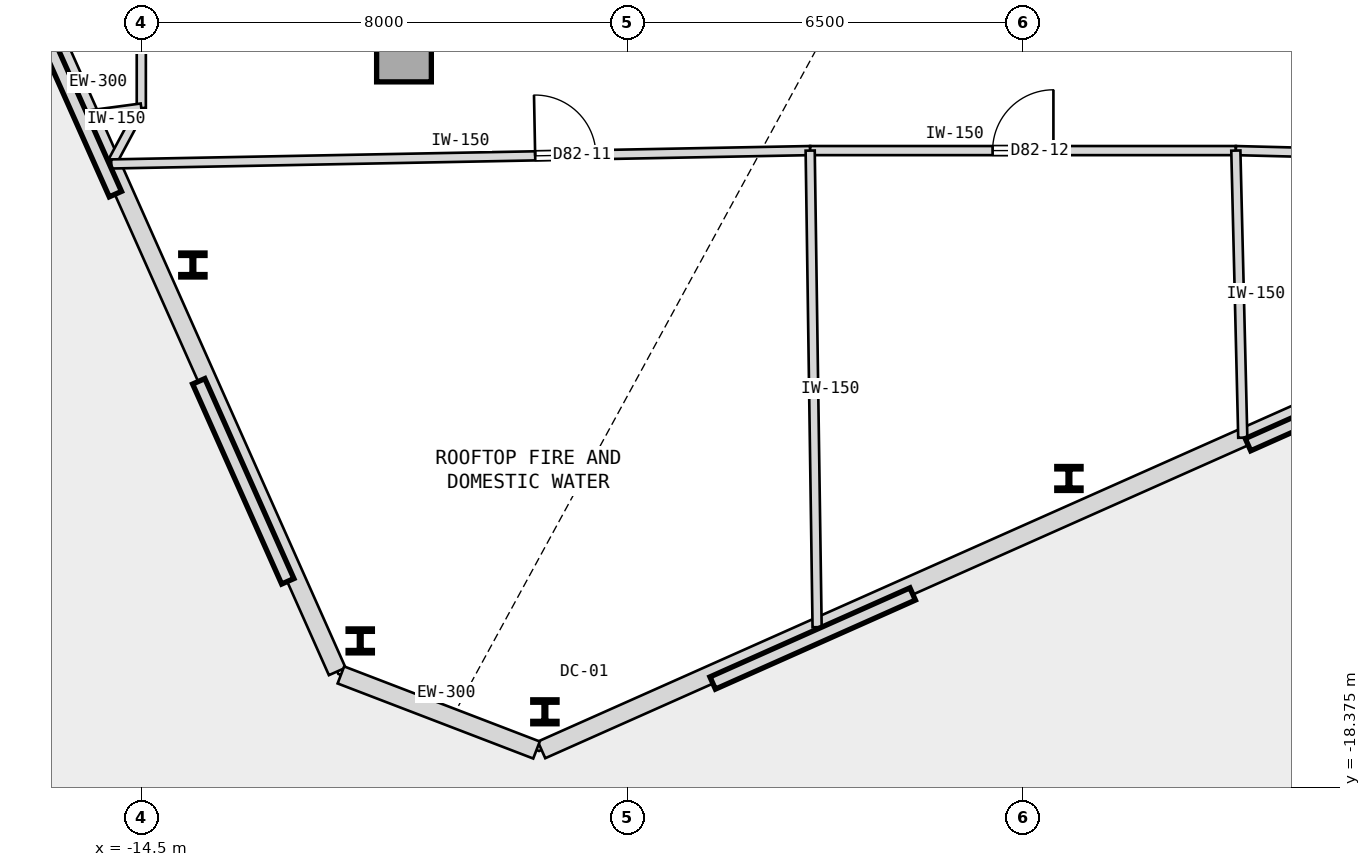
"""IFC4 building model, lengths in metres.
Left out: names, types, materials, properties, quantities, classifications, styles, units other than length and angle.
Written with IfcOpenShell. Run it as: python <this file> out.ifc"""

import sys

from ifc_helpers import new_model, si_unit, direction, frame, frame_2d, origin, origin_2d, place, context, subcontext, project, spatial, rectangle, i_section, extrude, element, fill, save


model = new_model("IFC4")
c1 = context("Model", 3, precision=1e-05, world=origin(), true_north=direction((0.0, 1.0)))
c2 = subcontext(c1, "Body", "Model", "MODEL_VIEW")
j1 = project(units=[si_unit("LENGTHUNIT", "METRE"), si_unit("PLANEANGLEUNIT", "RADIAN")], contexts=[c1])
p1 = place(None, origin())
s1 = spatial("IfcSite", under=j1, at=p1, CompositionType="ELEMENT")
p2 = place(p1, origin())
s2 = spatial("IfcBuilding", under=s1, at=p2, CompositionType="ELEMENT")
p3 = place(p2, frame((0.0, 0.0, 305.55)))
s3 = spatial("IfcBuildingStorey", under=s2, at=p3, CompositionType="ELEMENT", Elevation=305.55)
p4 = place(p3, frame((-10.18, -6.32, 0.0), z_axis=(0.0, 0.0, 1.0), x_axis=(1.0, 0.0, 0.0)))
e1 = element("IfcColumn", 1, at=p4, inside=s3, PredefinedType="COLUMN", context=c2, shape_type="SweptSolid", body=[
    extrude(rectangle(XDim=0.9, YDim=0.9, at=origin_2d()), origin(), (0.0, 0.0, 1.0), 6.45),
])
for number, where, z_axis, x_axis in (
    (2, (-7.863, -17.129, 0.0), (0.0, 0.0, 1.0), (1.0, 0.0, 0.0)),
    (3, (0.755, -13.292, 0.0), (0.0, 0.0, 1.0), (1.0, 0.0, 0.0)),
    (4, (-13.652, -9.781, 0.0), (0.0, 0.0, 1.0), (1.0, 0.0, 0.0)),
    (5, (-10.899, -15.963, 0.0), (0.0, 0.0, 1.0), (1.0, 0.0, 0.0)),
):
    element("IfcColumn", number, at=place(p3, frame(where, z_axis=z_axis, x_axis=x_axis)), inside=s3, PredefinedType="COLUMN", context=c2, shape_type="SweptSolid", body=[
        extrude(i_section(OverallWidth=0.399, OverallDepth=0.394, WebThickness=0.023, FlangeThickness=0.037, FilletRadius=0.015, at=origin_2d()), origin(), (0.0, 0.0, 1.0), 6.45),
    ])
p5 = place(p3, frame((-7.918, -17.756, 0.0), z_axis=(0.0, 0.0, 1.0), x_axis=(0.913542158844, 0.406744052217, 0.0)))
e6 = element("IfcWall", 6, at=p5, inside=s3, PredefinedType="STANDARD", context=c2, shape_type="SweptSolid", body=[
    extrude(rectangle(XDim=28.91, YDim=0.3, at=frame_2d((14.455, 0.0))), origin(), (0.0, 0.0, 1.0), 6.1),
])
p6 = place(p3, frame((-19.783, 2.637, 0.0), z_axis=(0.0, 0.0, 1.0), x_axis=(0.406736369999, -0.913545579224, 0.0)))
e7 = element("IfcWall", 7, at=p6, inside=s3, PredefinedType="STANDARD", context=c2, shape_type="SweptSolid", body=[
    extrude(rectangle(XDim=20.91, YDim=0.3, at=frame_2d((10.455, 0.0))), origin(), (0.0, 0.0, 1.0), 6.1),
])
p7 = place(p3, frame((-11.218, -16.523, 0.0), z_axis=(0.0, 0.0, 1.0), x_axis=(0.933599212806, -0.358319005704, 0.0)))
e8 = element("IfcWall", 8, at=p7, inside=s3, PredefinedType="STANDARD", context=c2, shape_type="SweptSolid", body=[
    extrude(rectangle(XDim=3.446, YDim=0.3, at=frame_2d((1.723, 0.0))), origin(), (0.0, 0.0, 1.0), 6.1),
])
p8 = place(p3, frame((-13.24, -30.161, 0.0), z_axis=(0.0, 0.0, 1.0), x_axis=(0.913545087995, 0.406737473317, 0.0)))
e9 = element("IfcWall", 9, at=p8, inside=s3, PredefinedType="PARAPET", context=c2, shape_type="SweptSolid", body=[
    extrude(rectangle(XDim=51.158, YDim=0.22, at=frame_2d((25.579, 0.0))), origin(), (0.0, 0.0, 1.0), 1.2),
])
p9 = place(p3, frame((-14.5, -7.2, 0.0), z_axis=(0.0, 0.0, 1.0), x_axis=(0.0, 1.0, 0.0)))
e10 = element("IfcWall", 10, at=p9, inside=s3, PredefinedType="PARTITIONING", context=c2, shape_type="SweptSolid", body=[
    extrude(rectangle(XDim=1.6, YDim=0.15, at=frame_2d((0.8, 0.0))), origin(), (0.0, 0.0, 1.0), 6.1),
])
p10 = place(p3, frame((-14.994, -8.12, 0.0), z_axis=(0.0, 0.0, 1.0), x_axis=(0.472844275985, 0.881146009847, 0.0)))
e11 = element("IfcWall", 11, at=p10, inside=s3, PredefinedType="PARTITIONING", context=c2, shape_type="SweptSolid", body=[
    extrude(rectangle(XDim=1.044, YDim=0.15, at=frame_2d((0.522, 0.0))), origin(), (0.0, 0.0, 1.0), 6.1),
])
p11 = place(p3, frame((-14.994, -8.12, 0.0), z_axis=(0.0, 0.0, 1.0), x_axis=(0.99981691014, 0.019134947025, 0.0)))
e12 = element("IfcWall", 12, at=p11, inside=s3, PredefinedType="PARTITIONING", context=c2, shape_type="SweptSolid", body=[
    extrude(rectangle(XDim=11.496, YDim=0.15, at=frame_2d((5.748, 0.0))), origin(), (0.0, 0.0, 1.0), 6.1),
])
p12 = place(p11, frame((6.972, 0.0, 0.0)))
e13 = element("IfcOpeningElement", 13, at=p12, cuts=e12, PredefinedType="OPENING", context=c2, shape_type="SweptSolid", body=[
    extrude(rectangle(XDim=1.0, YDim=2.15, at=frame_2d((0.5, 1.075))), frame((0.0, 0.085, 0.0), z_axis=(0.0, -1.0, 0.0), x_axis=(1.0, 0.0, 0.0)), (0.0, 0.0, 1.0), 0.17),
])
p13 = place(p3, frame((-3.5, -7.9, 0.0), z_axis=(0.0, 0.0, 1.0), x_axis=(1.0, 0.0, 0.0)))
e14 = element("IfcWall", 14, at=p13, inside=s3, PredefinedType="PARTITIONING", context=c2, shape_type="SweptSolid", body=[
    extrude(rectangle(XDim=7.0, YDim=0.15, at=frame_2d((3.5, 0.0))), origin(), (0.0, 0.0, 1.0), 6.1),
])
p14 = place(p13, frame((3.0, 0.0, 0.0)))
e15 = element("IfcOpeningElement", 15, at=p14, cuts=e14, PredefinedType="OPENING", context=c2, shape_type="SweptSolid", body=[
    extrude(rectangle(XDim=1.0, YDim=2.15, at=frame_2d((0.5, 1.075))), frame((0.0, 0.085, 0.0), z_axis=(0.0, -1.0, 0.0), x_axis=(1.0, 0.0, 0.0)), (0.0, 0.0, 1.0), 0.17),
])
p15 = place(p3, frame((3.5, -7.9, 0.0), z_axis=(0.0, 0.0, 1.0), x_axis=(0.99968204603, -0.025215210576, 0.0)))
e16 = element("IfcWall", 16, at=p15, inside=s3, PredefinedType="PARTITIONING", context=c2, shape_type="SweptSolid", body=[
    extrude(rectangle(XDim=10.147, YDim=0.15, at=frame_2d((5.073, 0.0))), origin(), (0.0, 0.0, 1.0), 6.1),
])
p16 = place(p15, frame((4.573, 0.0, 0.0)))
e17 = element("IfcOpeningElement", 17, at=p16, cuts=e16, PredefinedType="OPENING", context=c2, shape_type="SweptSolid", body=[
    extrude(rectangle(XDim=1.0, YDim=2.15, at=frame_2d((0.5, 1.075))), frame((0.0, 0.085, 0.0), z_axis=(0.0, -1.0, 0.0), x_axis=(1.0, 0.0, 0.0)), (0.0, 0.0, 1.0), 0.17),
])
p17 = place(p3, frame((-15.353, -7.314, 0.0), z_axis=(0.0, 0.0, 1.0), x_axis=(0.991213020037, 0.132275277015, 0.0)))
e18 = element("IfcWall", 18, at=p17, inside=s3, PredefinedType="PARTITIONING", context=c2, shape_type="SweptSolid", body=[
    extrude(rectangle(XDim=0.86, YDim=0.15, at=frame_2d((0.43, 0.0))), origin(), (0.0, 0.0, 1.0), 6.1),
])
p18 = place(p3, frame((-3.386, -15.738, 0.0), z_axis=(0.0, 0.0, 1.0), x_axis=(-0.014544935188, 0.999894216835, 0.0)))
e19 = element("IfcWall", 19, at=p18, inside=s3, PredefinedType="PARTITIONING", context=c2, shape_type="SweptSolid", body=[
    extrude(rectangle(XDim=7.839, YDim=0.15, at=frame_2d((3.919, 0.0))), origin(), (0.0, 0.0, 1.0), 6.1),
])
p19 = place(p3, frame((3.614, -12.621, 0.0), z_axis=(0.0, 0.0, 1.0), x_axis=(-0.024142304503, 0.99970853209, 0.0)))
e20 = element("IfcWall", 20, at=p19, inside=s3, PredefinedType="PARTITIONING", context=c2, shape_type="SweptSolid", body=[
    extrude(rectangle(XDim=4.723, YDim=0.15, at=frame_2d((2.361, 0.0))), origin(), (0.0, 0.0, 1.0), 6.1),
])
p20 = place(p12, origin())
e21 = element("IfcDoor", 21, at=p20, inside=s3, OperationType="SINGLE_SWING_LEFT", PredefinedType="DOOR", context=c2, shape_type="SweptSolid", body=[
    extrude(rectangle(XDim=1.0, YDim=2.15, at=frame_2d((0.5, 1.075))), frame((0.0, 0.025, 0.0), z_axis=(0.0, -1.0, 0.0), x_axis=(1.0, 0.0, 0.0)), (0.0, 0.0, 1.0), 0.05),
])
fill(e13, e21)
p21 = place(p14, origin())
e22 = element("IfcDoor", 22, at=p21, inside=s3, OperationType="SINGLE_SWING_RIGHT", PredefinedType="DOOR", context=c2, shape_type="SweptSolid", body=[
    extrude(rectangle(XDim=1.0, YDim=2.15, at=frame_2d((0.5, 1.075))), frame((0.0, 0.025, 0.0), z_axis=(0.0, -1.0, 0.0), x_axis=(1.0, 0.0, 0.0)), (0.0, 0.0, 1.0), 0.05),
])
fill(e15, e22)
save(model, sys.argv[1])
